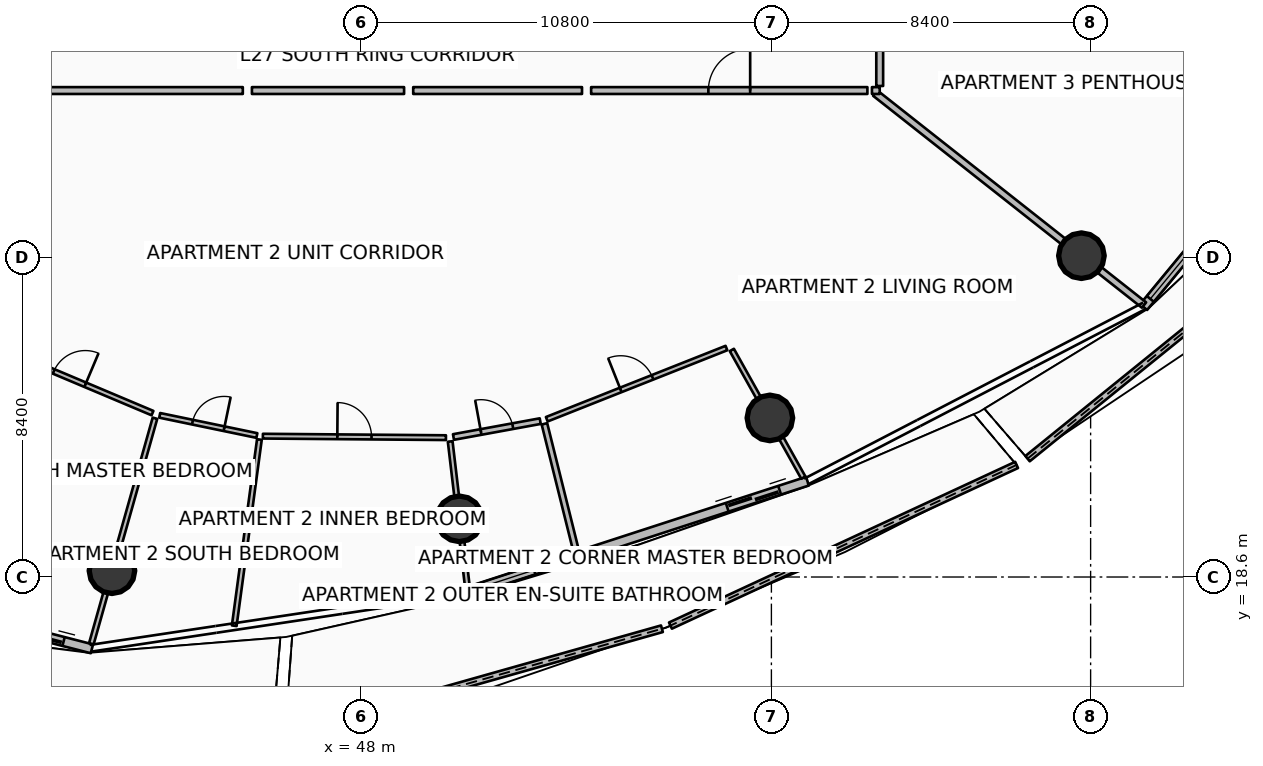
"""IFC4 building model, lengths in metres.
Left out: names, types, materials, properties, quantities, classifications, styles, units other than length and angle.
Written with IfcOpenShell. Run it as: python <this file> out.ifc"""

import sys

from ifc_helpers import new_model, si_unit, direction, frame, frame_2d, origin, origin_2d, place, context, subcontext, project, spatial, polyline, rectangle, circle, outline, extrude, element, fill, save


model = new_model("IFC4")
c1 = context("Model", 3, precision=1e-05, world=origin(), true_north=direction((0.0, 1.0)))
c2 = subcontext(c1, "Body", "Model", "MODEL_VIEW")
j1 = project(units=[si_unit("LENGTHUNIT", "METRE"), si_unit("PLANEANGLEUNIT", "RADIAN")], contexts=[c1])
p1 = place(None, origin())
s1 = spatial("IfcSite", under=j1, at=p1, CompositionType="ELEMENT")
p2 = place(p1, origin())
s2 = spatial("IfcBuilding", under=s1, at=p2, CompositionType="ELEMENT")
p3 = place(p2, frame((0.0, 0.0, 108.9)))
s3 = spatial("IfcBuildingStorey", under=s2, at=p3, CompositionType="ELEMENT", Elevation=108.9)
for number, where, z_axis, x_axis in (
    (1, (41.447, 18.766, 0.0), (0.0, 0.0, 1.0), (1.0, 0.0, 0.0)),
    (2, (50.588, 20.131, 0.0), (0.0, 0.0, 1.0), (1.0, 0.0, 0.0)),
    (3, (58.76, 22.786, 0.0), (0.0, 0.0, 1.0), (1.0, 0.0, 0.0)),
    (4, (66.958, 27.055, 0.0), (0.0, 0.0, 1.0), (1.0, 0.0, 0.0)),
):
    element("IfcColumn", number, at=place(p3, frame(where, z_axis=z_axis, x_axis=x_axis)), inside=s3, PredefinedType="COLUMN", context=c2, shape_type="SweptSolid", body=[
        extrude(circle(Radius=0.6, at=origin_2d()), origin(), (0.0, 0.0, 1.0), 3.5),
    ])
p4 = place(p3, frame((46.0, 14.436, 0.0), z_axis=(0.0, 0.0, 1.0), x_axis=(0.962322473133, 0.271910753195, 0.0)))
e5 = element("IfcWall", 5, at=p4, inside=s3, PredefinedType="PARAPET", context=c2, shape_type="SweptSolid", body=[
    extrude(outline(polyline([(0.0, 0.0), (10.308, 0.0), (10.308, 1.632), (5.154, 1.798), (0.0, 1.86), (0.0, 0.0)])), frame((0.0, 0.09, 0.0), z_axis=(0.0, -1.0, 0.0), x_axis=(1.0, 0.0, 0.0)), (0.0, 0.0, 1.0), 0.18),
])
p5 = place(p3, frame((56.144, 17.322, 0.0), z_axis=(0.0, 0.0, 1.0), x_axis=(0.907065674135, 0.420989148086, 0.0)))
e6 = element("IfcWall", 6, at=p5, inside=s3, PredefinedType="PARAPET", context=c2, shape_type="SweptSolid", body=[
    extrude(outline(polyline([(0.0, 0.0), (10.041, 0.0), (10.042, 1.233), (5.021, 1.418), (0.0, 1.632), (0.0, 0.0)])), frame((0.0, 0.09, 0.0), z_axis=(0.0, -1.0, 0.0), x_axis=(1.0, 0.0, 0.0)), (0.0, 0.0, 1.0), 0.18),
])
p6 = place(p3, frame((65.541, 21.715, 0.0), z_axis=(0.0, 0.0, 1.0), x_axis=(0.777242274281, 0.629201436005, 0.0)))
e7 = element("IfcWall", 7, at=p6, inside=s3, PredefinedType="PARAPET", context=c2, shape_type="SweptSolid", body=[
    extrude(outline(polyline([(0.0, 0.0), (10.949, 0.0), (10.949, 1.148), (5.474, 1.127), (0.0, 1.224), (0.0, 0.0)])), frame((0.0, 0.09, 0.0), z_axis=(0.0, -1.0, 0.0), x_axis=(1.0, 0.0, 0.0)), (0.0, 0.0, 1.0), 0.18),
])
p7 = place(p3, frame((30.186, 19.477, 0.0), z_axis=(0.0, 0.0, 1.0), x_axis=(0.968356180858, -0.249572248045, 0.0)))
e8 = element("IfcWall", 8, at=p7, inside=s3, PredefinedType="SOLIDWALL", context=c2, shape_type="SweptSolid", body=[
    extrude(rectangle(XDim=11.084, YDim=0.24, at=frame_2d((5.542, 0.0))), origin(), (0.0, 0.0, 1.0), 2.45),
])
p8 = place(p7, frame((8.865, 0.0, 0.0)))
e9 = element("IfcOpeningElement", 9, at=p8, cuts=e8, PredefinedType="OPENING", context=c2, shape_type="SweptSolid", body=[
    extrude(rectangle(XDim=1.45, YDim=2.15, at=frame_2d((0.725, 1.075))), frame((0.0, 0.13, 0.0), z_axis=(0.0, -1.0, 0.0), x_axis=(1.0, 0.0, 0.0)), (0.0, 0.0, 1.0), 0.26),
])
p9 = place(p7, frame((0.28, 0.0, 0.65)))
e10 = element("IfcOpeningElement", 10, at=p9, cuts=e8, PredefinedType="OPENING", context=c2, shape_type="SweptSolid", body=[
    extrude(rectangle(XDim=1.6, YDim=1.5, at=frame_2d((0.8, 0.75))), frame((0.0, 0.13, 0.0), z_axis=(0.0, -1.0, 0.0), x_axis=(1.0, 0.0, 0.0)), (0.0, 0.0, 1.0), 0.26),
])
p10 = place(p3, frame((50.767, 18.203, 0.0), z_axis=(0.0, 0.0, 1.0), x_axis=(0.951052494852, 0.30902937083, 0.0)))
e11 = element("IfcWall", 11, at=p10, inside=s3, PredefinedType="SOLIDWALL", context=c2, shape_type="SweptSolid", body=[
    extrude(rectangle(XDim=9.444, YDim=0.24, at=frame_2d((4.722, 0.0))), origin(), (0.0, 0.0, 1.0), 2.45),
])
p11 = place(p10, frame((7.224, 0.0, 0.0)))
e12 = element("IfcOpeningElement", 12, at=p11, cuts=e11, PredefinedType="OPENING", context=c2, shape_type="SweptSolid", body=[
    extrude(rectangle(XDim=1.45, YDim=2.15, at=frame_2d((0.725, 1.075))), frame((0.0, 0.13, 0.0), z_axis=(0.0, -1.0, 0.0), x_axis=(1.0, 0.0, 0.0)), (0.0, 0.0, 1.0), 0.26),
])
p12 = place(p10, frame((0.28, 0.0, 0.65)))
e13 = element("IfcOpeningElement", 13, at=p12, cuts=e11, PredefinedType="OPENING", context=c2, shape_type="SweptSolid", body=[
    extrude(rectangle(XDim=1.6, YDim=1.5, at=frame_2d((0.8, 0.75))), frame((0.0, 0.13, 0.0), z_axis=(0.0, -1.0, 0.0), x_axis=(1.0, 0.0, 0.0)), (0.0, 0.0, 1.0), 0.26),
])
p13 = place(p3, frame((68.593, 25.702, 0.0), z_axis=(0.0, 0.0, 1.0), x_axis=(0.636704975, 0.771107498868, 0.0)))
e14 = element("IfcWall", 14, at=p13, inside=s3, PredefinedType="SOLIDWALL", context=c2, shape_type="SweptSolid", body=[
    extrude(rectangle(XDim=11.084, YDim=0.24, at=frame_2d((5.542, 0.0))), origin(), (0.0, 0.0, 1.0), 2.45),
])
p14 = place(p13, frame((8.864, 0.0, 0.0)))
e15 = element("IfcOpeningElement", 15, at=p14, cuts=e14, PredefinedType="OPENING", context=c2, shape_type="SweptSolid", body=[
    extrude(rectangle(XDim=1.45, YDim=2.15, at=frame_2d((0.725, 1.075))), frame((0.0, 0.13, 0.0), z_axis=(0.0, -1.0, 0.0), x_axis=(1.0, 0.0, 0.0)), (0.0, 0.0, 1.0), 0.26),
])
p15 = place(p13, frame((0.28, 0.0, 0.65)))
e16 = element("IfcOpeningElement", 16, at=p15, cuts=e14, PredefinedType="OPENING", context=c2, shape_type="SweptSolid", body=[
    extrude(rectangle(XDim=1.6, YDim=1.5, at=frame_2d((0.8, 0.75))), frame((0.0, 0.13, 0.0), z_axis=(0.0, -1.0, 0.0), x_axis=(1.0, 0.0, 0.0)), (0.0, 0.0, 1.0), 0.26),
])
p16 = place(p3, frame((61.532, 31.332, 0.0), z_axis=(0.0, 0.0, 1.0), x_axis=(0.785307944478, -0.619105348337, 0.0)))
e17 = element("IfcWall", 17, at=p16, inside=s3, PredefinedType="PARTITIONING", context=c2, shape_type="SweptSolid", body=[
    extrude(rectangle(XDim=9.006, YDim=0.18, at=frame_2d((4.503, 0.0))), origin(), (0.0, 0.0, 1.0), 2.94),
])
p17 = place(p3, frame((54.056, 31.4, 0.0), z_axis=(0.0, 0.0, 1.0), x_axis=(1.0, 0.0, 0.0)))
e18 = element("IfcWall", 18, at=p17, inside=s3, PredefinedType="PARTITIONING", context=c2, shape_type="SweptSolid", body=[
    extrude(rectangle(XDim=7.27, YDim=0.18, at=frame_2d((3.635, 0.0))), origin(), (0.0, 0.0, 1.0), 2.94),
])
p18 = place(p17, frame((3.085, 0.0, 0.0)))
e19 = element("IfcOpeningElement", 19, at=p18, cuts=e18, PredefinedType="OPENING", context=c2, shape_type="SweptSolid", body=[
    extrude(rectangle(XDim=1.1, YDim=2.1, at=frame_2d((0.55, 1.05))), frame((0.0, 0.1, 0.0), z_axis=(0.0, -1.0, 0.0), x_axis=(1.0, 0.0, 0.0)), (0.0, 0.0, 1.0), 0.2),
])
p19 = place(p3, frame((39.764, 31.4, 0.0), z_axis=(0.0, 0.0, 1.0), x_axis=(1.0, 0.0, 0.0)))
e20 = element("IfcWall", 20, at=p19, inside=s3, PredefinedType="PARTITIONING", context=c2, shape_type="SweptSolid", body=[
    extrude(rectangle(XDim=5.127, YDim=0.18, at=frame_2d((2.563, 0.0))), origin(), (0.0, 0.0, 1.0), 2.94),
])
p20 = place(p3, frame((38.147, 24.754, 0.0), z_axis=(0.0, 0.0, 1.0), x_axis=(0.921465596947, -0.388459976888, 0.0)))
e21 = element("IfcWall", 21, at=p20, inside=s3, PredefinedType="PARTITIONING", context=c2, shape_type="SweptSolid", body=[
    extrude(rectangle(XDim=4.74, YDim=0.125, at=frame_2d((2.37, 0.0))), origin(), (0.0, 0.0, 1.0), 2.94),
])
p21 = place(p20, frame((1.92, 0.0, 0.0)))
e22 = element("IfcOpeningElement", 22, at=p21, cuts=e21, PredefinedType="OPENING", context=c2, shape_type="SweptSolid", body=[
    extrude(rectangle(XDim=0.9, YDim=2.08, at=frame_2d((0.45, 1.04))), frame((0.0, 0.073, 0.0), z_axis=(0.0, -1.0, 0.0), x_axis=(1.0, 0.0, 0.0)), (0.0, 0.0, 1.0), 0.145),
])
p22 = place(p3, frame((45.131, 31.4, 0.0), z_axis=(0.0, 0.0, 1.0), x_axis=(1.0, 0.0, 0.0)))
e23 = element("IfcWall", 23, at=p22, inside=s3, PredefinedType="PARTITIONING", context=c2, shape_type="SweptSolid", body=[
    extrude(rectangle(XDim=4.004, YDim=0.18, at=frame_2d((2.002, 0.0))), origin(), (0.0, 0.0, 1.0), 2.94),
])
p23 = place(p3, frame((42.579, 22.778, 0.0), z_axis=(0.0, 0.0, 1.0), x_axis=(-0.271466748189, -0.962447819171, 0.0)))
e24 = element("IfcWall", 24, at=p23, inside=s3, PredefinedType="PARTITIONING", context=c2, shape_type="SweptSolid", body=[
    extrude(rectangle(XDim=6.166, YDim=0.125, at=frame_2d((3.083, 0.0))), origin(), (0.0, 0.0, 1.0), 2.94),
])
p24 = place(p3, frame((45.327, 22.218, 0.0), z_axis=(0.0, 0.0, 1.0), x_axis=(-0.133861540622, -0.99100004437, 0.0)))
e25 = element("IfcWall", 25, at=p24, inside=s3, PredefinedType="PARTITIONING", context=c2, shape_type="SweptSolid", body=[
    extrude(rectangle(XDim=4.944, YDim=0.125, at=frame_2d((2.472, 0.0))), origin(), (0.0, 0.0, 1.0), 2.94),
])
p25 = place(p3, frame((42.704, 22.854, 0.0), z_axis=(0.0, 0.0, 1.0), x_axis=(0.979145769619, -0.203158957069, 0.0)))
e26 = element("IfcWall", 26, at=p25, inside=s3, PredefinedType="PARTITIONING", context=c2, shape_type="SweptSolid", body=[
    extrude(rectangle(XDim=2.611, YDim=0.125, at=frame_2d((1.306, 0.0))), origin(), (0.0, 0.0, 1.0), 2.94),
])
p26 = place(p25, frame((0.881, 0.0, 0.0)))
e27 = element("IfcOpeningElement", 27, at=p26, cuts=e26, PredefinedType="OPENING", context=c2, shape_type="SweptSolid", body=[
    extrude(rectangle(XDim=0.85, YDim=2.06, at=frame_2d((0.425, 1.03))), frame((0.0, 0.073, 0.0), z_axis=(0.0, -1.0, 0.0), x_axis=(1.0, 0.0, 0.0)), (0.0, 0.0, 1.0), 0.145),
])
p27 = place(p3, frame((45.419, 22.306, 0.0), z_axis=(0.0, 0.0, 1.0), x_axis=(0.99996628587, -0.008211401983, 0.0)))
e28 = element("IfcWall", 28, at=p27, inside=s3, PredefinedType="PARTITIONING", context=c2, shape_type="SweptSolid", body=[
    extrude(rectangle(XDim=4.817, YDim=0.125, at=frame_2d((2.408, 0.0))), origin(), (0.0, 0.0, 1.0), 2.94),
])
p28 = place(p27, frame((1.958, 0.0, 0.0)))
e29 = element("IfcOpeningElement", 29, at=p28, cuts=e28, PredefinedType="OPENING", context=c2, shape_type="SweptSolid", body=[
    extrude(rectangle(XDim=0.9, YDim=2.08, at=frame_2d((0.45, 1.04))), frame((0.0, 0.073, 0.0), z_axis=(0.0, -1.0, 0.0), x_axis=(1.0, 0.0, 0.0)), (0.0, 0.0, 1.0), 0.145),
])
p29 = place(p3, frame((49.375, 31.4, 0.0), z_axis=(0.0, 0.0, 1.0), x_axis=(1.0, 0.0, 0.0)))
e30 = element("IfcWall", 30, at=p29, inside=s3, PredefinedType="PARTITIONING", context=c2, shape_type="SweptSolid", body=[
    extrude(rectangle(XDim=4.442, YDim=0.18, at=frame_2d((2.221, 0.0))), origin(), (0.0, 0.0, 1.0), 2.94),
])
p30 = place(p3, frame((50.347, 22.167, 0.0), z_axis=(0.0, 0.0, 1.0), x_axis=(0.117544011215, -0.993067674143, 0.0)))
e31 = element("IfcWall", 31, at=p30, inside=s3, PredefinedType="PARTITIONING", context=c2, shape_type="SweptSolid", body=[
    extrude(rectangle(XDim=3.95, YDim=0.125, at=frame_2d((1.975, 0.0))), origin(), (0.0, 0.0, 1.0), 2.94),
])
p31 = place(p3, frame((57.759, 24.575, 0.0), z_axis=(0.0, 0.0, 1.0), x_axis=(0.488595646066, -0.87251034071, 0.0)))
e32 = element("IfcWall", 32, at=p31, inside=s3, PredefinedType="PARTITIONING", context=c2, shape_type="SweptSolid", body=[
    extrude(rectangle(XDim=3.851, YDim=0.125, at=frame_2d((1.925, 0.0))), origin(), (0.0, 0.0, 1.0), 2.94),
])
p32 = place(p3, frame((50.434, 22.284, 0.0), z_axis=(0.0, 0.0, 1.0), x_axis=(0.983653785842, 0.18007006858, 0.0)))
e33 = element("IfcWall", 33, at=p32, inside=s3, PredefinedType="PARTITIONING", context=c2, shape_type="SweptSolid", body=[
    extrude(rectangle(XDim=2.321, YDim=0.15, at=frame_2d((1.161, 0.0))), origin(), (0.0, 0.0, 1.0), 2.94),
])
p33 = place(p32, frame((0.736, 0.0, 0.0)))
e34 = element("IfcOpeningElement", 34, at=p33, cuts=e33, PredefinedType="OPENING", context=c2, shape_type="SweptSolid", body=[
    extrude(rectangle(XDim=0.85, YDim=2.06, at=frame_2d((0.425, 1.03))), frame((0.0, 0.085, 0.0), z_axis=(0.0, -1.0, 0.0), x_axis=(1.0, 0.0, 0.0)), (0.0, 0.0, 1.0), 0.17),
])
p34 = place(p3, frame((52.828, 22.631, 0.0), z_axis=(0.0, 0.0, 1.0), x_axis=(0.241821205531, -0.970320825581, 0.0)))
e35 = element("IfcWall", 35, at=p34, inside=s3, PredefinedType="PARTITIONING", context=c2, shape_type="SweptSolid", body=[
    extrude(rectangle(XDim=3.458, YDim=0.15, at=frame_2d((1.729, 0.0))), origin(), (0.0, 0.0, 1.0), 2.94),
])
p35 = place(p3, frame((52.889, 22.751, 0.0), z_axis=(0.0, 0.0, 1.0), x_axis=(0.929640857273, 0.368466927266, 0.0)))
e36 = element("IfcWall", 36, at=p35, inside=s3, PredefinedType="PARTITIONING", context=c2, shape_type="SweptSolid", body=[
    extrude(rectangle(XDim=5.085, YDim=0.125, at=frame_2d((2.543, 0.0))), origin(), (0.0, 0.0, 1.0), 2.94),
])
p36 = place(p35, frame((2.093, 0.0, 0.0)))
e37 = element("IfcOpeningElement", 37, at=p36, cuts=e36, PredefinedType="OPENING", context=c2, shape_type="SweptSolid", body=[
    extrude(rectangle(XDim=0.9, YDim=2.08, at=frame_2d((0.45, 1.04))), frame((0.0, 0.073, 0.0), z_axis=(0.0, -1.0, 0.0), x_axis=(1.0, 0.0, 0.0)), (0.0, 0.0, 1.0), 0.145),
])
p37 = place(p3, frame((61.446, 31.4, 0.0), z_axis=(0.0, 0.0, 1.0), x_axis=(1.0, 0.0, 0.0)))
e38 = element("IfcWall", 38, at=p37, inside=s3, PredefinedType="PARTITIONING", context=c2, shape_type="SweptSolid", body=[
    extrude(rectangle(XDim=0.204, YDim=0.18, at=frame_2d((0.102, 0.0))), origin(), (0.0, 0.0, 1.0), 2.94),
])
p38 = place(p3, frame((61.65, 31.52, 0.0), z_axis=(0.0, 0.0, 1.0), x_axis=(0.0, 1.0, 0.0)))
e39 = element("IfcWall", 39, at=p38, inside=s3, PredefinedType="PARTITIONING", context=c2, shape_type="SweptSolid", body=[
    extrude(rectangle(XDim=6.51, YDim=0.18, at=frame_2d((3.255, 0.0))), origin(), (0.0, 0.0, 1.0), 2.94),
])
p39 = place(p38, frame((2.705, 0.0, 0.0)))
e40 = element("IfcOpeningElement", 40, at=p39, cuts=e39, PredefinedType="OPENING", context=c2, shape_type="SweptSolid", body=[
    extrude(rectangle(XDim=1.1, YDim=2.1, at=frame_2d((0.55, 1.05))), frame((0.0, 0.1, 0.0), z_axis=(0.0, -1.0, 0.0), x_axis=(1.0, 0.0, 0.0)), (0.0, 0.0, 1.0), 0.2),
])
p40 = place(p8, origin())
e41 = element("IfcDoor", 41, at=p40, inside=s3, OperationType="DOUBLE_DOOR_SLIDING", PredefinedType="DOOR", context=c2, shape_type="SweptSolid", body=[
    extrude(rectangle(XDim=1.45, YDim=2.15, at=frame_2d((0.725, 1.075))), frame((0.0, 0.025, 0.0), z_axis=(0.0, -1.0, 0.0), x_axis=(1.0, 0.0, 0.0)), (0.0, 0.0, 1.0), 0.05),
])
fill(e9, e41)
p41 = place(p11, origin())
e42 = element("IfcDoor", 42, at=p41, inside=s3, OperationType="DOUBLE_DOOR_SLIDING", PredefinedType="DOOR", context=c2, shape_type="SweptSolid", body=[
    extrude(rectangle(XDim=1.45, YDim=2.15, at=frame_2d((0.725, 1.075))), frame((0.0, 0.025, 0.0), z_axis=(0.0, -1.0, 0.0), x_axis=(1.0, 0.0, 0.0)), (0.0, 0.0, 1.0), 0.05),
])
fill(e12, e42)
p42 = place(p12, origin())
e43 = element("IfcWindow", 43, at=p42, inside=s3, PartitioningType="SINGLE_PANEL", PredefinedType="WINDOW", context=c2, shape_type="SweptSolid", body=[
    extrude(rectangle(XDim=1.6, YDim=1.5, at=frame_2d((0.8, 0.75))), frame((0.0, 0.03, 0.0), z_axis=(0.0, -1.0, 0.0), x_axis=(1.0, 0.0, 0.0)), (0.0, 0.0, 1.0), 0.06),
])
fill(e13, e43)
p43 = place(p15, origin())
e44 = element("IfcWindow", 44, at=p43, inside=s3, PartitioningType="SINGLE_PANEL", PredefinedType="WINDOW", context=c2, shape_type="SweptSolid", body=[
    extrude(rectangle(XDim=1.6, YDim=1.5, at=frame_2d((0.8, 0.75))), frame((0.0, 0.03, 0.0), z_axis=(0.0, -1.0, 0.0), x_axis=(1.0, 0.0, 0.0)), (0.0, 0.0, 1.0), 0.06),
])
fill(e16, e44)
p44 = place(p18, origin())
e45 = element("IfcDoor", 45, at=p44, inside=s3, OperationType="SINGLE_SWING_RIGHT", PredefinedType="DOOR", context=c2, shape_type="SweptSolid", body=[
    extrude(rectangle(XDim=1.1, YDim=2.1, at=frame_2d((0.55, 1.05))), frame((0.0, 0.025, 0.0), z_axis=(0.0, -1.0, 0.0), x_axis=(1.0, 0.0, 0.0)), (0.0, 0.0, 1.0), 0.05),
])
fill(e19, e45)
p45 = place(p21, origin())
e46 = element("IfcDoor", 46, at=p45, inside=s3, OperationType="SINGLE_SWING_RIGHT", PredefinedType="DOOR", context=c2, shape_type="SweptSolid", body=[
    extrude(rectangle(XDim=0.9, YDim=2.08, at=frame_2d((0.45, 1.04))), frame((0.0, 0.025, 0.0), z_axis=(0.0, -1.0, 0.0), x_axis=(1.0, 0.0, 0.0)), (0.0, 0.0, 1.0), 0.05),
])
fill(e22, e46)
p46 = place(p26, origin())
e47 = element("IfcDoor", 47, at=p46, inside=s3, OperationType="SINGLE_SWING_RIGHT", PredefinedType="DOOR", context=c2, shape_type="SweptSolid", body=[
    extrude(rectangle(XDim=0.85, YDim=2.06, at=frame_2d((0.425, 1.03))), frame((0.0, 0.025, 0.0), z_axis=(0.0, -1.0, 0.0), x_axis=(1.0, 0.0, 0.0)), (0.0, 0.0, 1.0), 0.05),
])
fill(e27, e47)
p47 = place(p28, origin())
e48 = element("IfcDoor", 48, at=p47, inside=s3, OperationType="SINGLE_SWING_LEFT", PredefinedType="DOOR", context=c2, shape_type="SweptSolid", body=[
    extrude(rectangle(XDim=0.9, YDim=2.08, at=frame_2d((0.45, 1.04))), frame((0.0, 0.025, 0.0), z_axis=(0.0, -1.0, 0.0), x_axis=(1.0, 0.0, 0.0)), (0.0, 0.0, 1.0), 0.05),
])
fill(e29, e48)
p48 = place(p33, origin())
e49 = element("IfcDoor", 49, at=p48, inside=s3, OperationType="SINGLE_SWING_LEFT", PredefinedType="DOOR", context=c2, shape_type="SweptSolid", body=[
    extrude(rectangle(XDim=0.85, YDim=2.06, at=frame_2d((0.425, 1.03))), frame((0.0, 0.025, 0.0), z_axis=(0.0, -1.0, 0.0), x_axis=(1.0, 0.0, 0.0)), (0.0, 0.0, 1.0), 0.05),
])
fill(e34, e49)
p49 = place(p36, origin())
e50 = element("IfcDoor", 50, at=p49, inside=s3, OperationType="SINGLE_SWING_LEFT", PredefinedType="DOOR", context=c2, shape_type="SweptSolid", body=[
    extrude(rectangle(XDim=0.9, YDim=2.08, at=frame_2d((0.45, 1.04))), frame((0.0, 0.025, 0.0), z_axis=(0.0, -1.0, 0.0), x_axis=(1.0, 0.0, 0.0)), (0.0, 0.0, 1.0), 0.05),
])
fill(e37, e50)
save(model, sys.argv[1])
